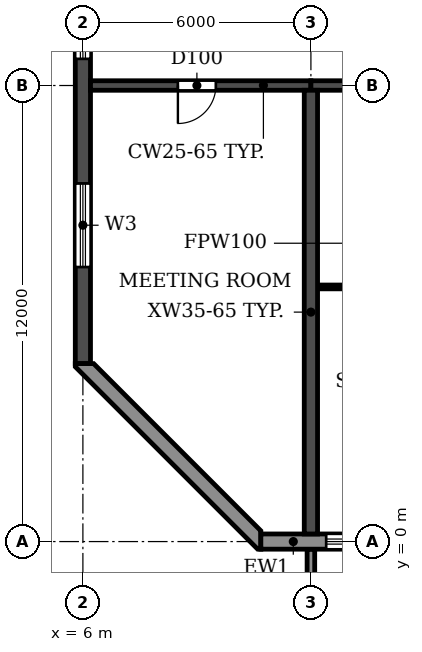
"""IFC4 building model, lengths in metres.
Left out: names, types, materials, properties, quantities, classifications, styles, units other than length and angle.
Written with IfcOpenShell. Run it as: python <this file> out.ifc"""

import sys

from ifc_helpers import new_model, si_unit, direction, frame, frame_2d, origin, place, context, subcontext, project, spatial, polyline, rectangle, outline, extrude, source, transform, mapped, element, fill, save


model = new_model("IFC4")
c1 = context("Model", 3, precision=1e-05, world=origin(), true_north=direction((0.0, 1.0)))
c2 = subcontext(c1, "Body", "Model", "MODEL_VIEW")
j1 = project(units=[si_unit("LENGTHUNIT", "METRE"), si_unit("PLANEANGLEUNIT", "RADIAN")], contexts=[c1])
p1 = place(None, origin())
s1 = spatial("IfcSite", under=j1, at=p1, CompositionType="ELEMENT")
p2 = place(p1, origin())
s2 = spatial("IfcBuilding", under=s1, at=p2, CompositionType="ELEMENT")
p3 = place(p2, frame((0.0, 0.0, 82.8)))
s3 = spatial("IfcBuildingStorey", under=s2, at=p3, CompositionType="ELEMENT", Elevation=82.8)
p4 = place(p3, frame((12.0, 0.2, 0.0), z_axis=(0.0, 0.0, 1.0), x_axis=(0.0, 1.0, 0.0)))
e1 = element("IfcWall", 1, at=p4, inside=s3, PredefinedType="SHEAR", context=c2, shape_type="SweptSolid", body=[
    extrude(rectangle(XDim=11.675, YDim=0.35, at=frame_2d((5.837, 0.0))), origin(), (0.0, 0.0, 1.0), 3.06),
])
p5 = place(p3, frame((6.0, 4.683, 0.0), z_axis=(0.0, 0.0, 1.0), x_axis=(0.0, 1.0, 0.0)))
e2 = element("IfcWall", 2, at=p5, inside=s3, PredefinedType="SHEAR", context=c2, shape_type="SweptSolid", body=[
    extrude(rectangle(XDim=34.234, YDim=0.4, at=frame_2d((17.117, 0.0))), origin(), (0.0, 0.0, 1.0), 3.06),
])
p6 = place(p5, frame((23.817, 0.0, 0.9)))
e3 = element("IfcOpeningElement", 3, at=p6, cuts=e2, PredefinedType="OPENING", context=c2, shape_type="SweptSolid", body=[
    extrude(rectangle(XDim=1.2, YDim=1.5, at=frame_2d((0.6, 0.75))), frame((0.0, 0.21, 0.0), z_axis=(0.0, -1.0, 0.0), x_axis=(1.0, 0.0, 0.0)), (0.0, 0.0, 1.0), 0.42),
])
p7 = place(p5, frame((8.017, 0.0, 0.9)))
e4 = element("IfcOpeningElement", 4, at=p7, cuts=e2, PredefinedType="OPENING", context=c2, shape_type="SweptSolid", body=[
    extrude(rectangle(XDim=1.2, YDim=1.5, at=frame_2d((0.6, 0.75))), frame((0.0, 0.21, 0.0), z_axis=(0.0, -1.0, 0.0), x_axis=(1.0, 0.0, 0.0)), (0.0, 0.0, 1.0), 0.42),
])
p8 = place(p5, frame((15.917, 0.0, 0.9)))
e5 = element("IfcOpeningElement", 5, at=p8, cuts=e2, PredefinedType="OPENING", context=c2, shape_type="SweptSolid", body=[
    extrude(rectangle(XDim=1.2, YDim=1.5, at=frame_2d((0.6, 0.75))), frame((0.0, 0.21, 0.0), z_axis=(0.0, -1.0, 0.0), x_axis=(1.0, 0.0, 0.0)), (0.0, 0.0, 1.0), 0.42),
])
p9 = place(p5, frame((28.894, 0.0, 0.6)))
e6 = element("IfcOpeningElement", 6, at=p9, cuts=e2, PredefinedType="OPENING", context=c2, shape_type="SweptSolid", body=[
    extrude(rectangle(XDim=2.2, YDim=1.8, at=frame_2d((1.1, 0.9))), frame((0.0, 0.21, 0.0), z_axis=(0.0, -1.0, 0.0), x_axis=(1.0, 0.0, 0.0)), (0.0, 0.0, 1.0), 0.42),
])
p10 = place(p5, frame((2.541, 0.0, 0.6)))
e7 = element("IfcOpeningElement", 7, at=p10, cuts=e2, PredefinedType="OPENING", context=c2, shape_type="SweptSolid", body=[
    extrude(rectangle(XDim=2.2, YDim=1.8, at=frame_2d((1.1, 0.9))), frame((0.0, 0.21, 0.0), z_axis=(0.0, -1.0, 0.0), x_axis=(1.0, 0.0, 0.0)), (0.0, 0.0, 1.0), 0.42),
])
p11 = place(p3, frame((6.2, 12.0, 0.0), z_axis=(0.0, 0.0, 1.0), x_axis=(1.0, 0.0, 0.0)))
e8 = element("IfcWall", 8, at=p11, inside=s3, PredefinedType="SHEAR", context=c2, shape_type="SweptSolid", body=[
    extrude(rectangle(XDim=5.8, YDim=0.25, at=frame_2d((2.9, 0.0))), origin(), (0.0, 0.0, 1.0), 2.46),
])
p12 = place(p11, frame((2.3, 0.0, 0.0)))
e9 = element("IfcOpeningElement", 9, at=p12, cuts=e8, PredefinedType="OPENING", context=c2, shape_type="SweptSolid", body=[
    extrude(rectangle(XDim=1.0, YDim=2.1, at=frame_2d((0.5, 1.05))), frame((0.0, 0.135, 0.0), z_axis=(0.0, -1.0, 0.0), x_axis=(1.0, 0.0, 0.0)), (0.0, 0.0, 1.0), 0.27),
])
p13 = place(p3, frame((12.0, 12.0, 0.0), z_axis=(0.0, 0.0, 1.0), x_axis=(1.0, 0.0, 0.0)))
e10 = element("IfcWall", 10, at=p13, inside=s3, PredefinedType="SHEAR", context=c2, shape_type="SweptSolid", body=[
    extrude(rectangle(XDim=6.0, YDim=0.25, at=frame_2d((3.0, 0.0))), origin(), (0.0, 0.0, 1.0), 2.46),
])
p14 = place(p13, frame((2.55, 0.0, 0.0)))
e11 = element("IfcOpeningElement", 11, at=p14, cuts=e10, PredefinedType="OPENING", context=c2, shape_type="SweptSolid", body=[
    extrude(rectangle(XDim=1.0, YDim=2.1, at=frame_2d((0.5, 1.05))), frame((0.0, 0.135, 0.0), z_axis=(0.0, -1.0, 0.0), x_axis=(1.0, 0.0, 0.0)), (0.0, 0.0, 1.0), 0.27),
])
p15 = place(p3, frame((10.683, 0.0, 0.0), z_axis=(0.0, 0.0, 1.0), x_axis=(1.0, 0.0, 0.0)))
e12 = element("IfcWall", 12, at=p15, inside=s3, PredefinedType="STANDARD", context=c2, shape_type="SweptSolid", body=[
    extrude(rectangle(XDim=80.634, YDim=0.4, at=frame_2d((40.317, 0.0))), origin(), (0.0, 0.0, 1.0), 3.06),
])
p16 = place(p15, frame((1.717, 0.0, 0.9)))
e13 = element("IfcOpeningElement", 13, at=p16, cuts=e12, PredefinedType="OPENING", context=c2, shape_type="SweptSolid", body=[
    extrude(rectangle(XDim=2.2, YDim=1.5, at=frame_2d((1.1, 0.75))), frame((0.0, 0.21, 0.0), z_axis=(0.0, -1.0, 0.0), x_axis=(1.0, 0.0, 0.0)), (0.0, 0.0, 1.0), 0.42),
])
p17 = place(p15, frame((4.917, 0.0, 0.0)))
e14 = element("IfcOpeningElement", 14, at=p17, cuts=e12, PredefinedType="OPENING", context=c2, shape_type="SweptSolid", body=[
    extrude(rectangle(XDim=1.8, YDim=2.4, at=frame_2d((0.9, 1.2))), frame((0.0, 0.21, 0.0), z_axis=(0.0, -1.0, 0.0), x_axis=(1.0, 0.0, 0.0)), (0.0, 0.0, 1.0), 0.42),
])
p18 = place(p15, frame((7.717, 0.0, 0.9)))
e15 = element("IfcOpeningElement", 15, at=p18, cuts=e12, PredefinedType="OPENING", context=c2, shape_type="SweptSolid", body=[
    extrude(rectangle(XDim=2.2, YDim=1.5, at=frame_2d((1.1, 0.75))), frame((0.0, 0.21, 0.0), z_axis=(0.0, -1.0, 0.0), x_axis=(1.0, 0.0, 0.0)), (0.0, 0.0, 1.0), 0.42),
])
p19 = place(p15, frame((10.717, 0.0, 0.9)))
e16 = element("IfcOpeningElement", 16, at=p19, cuts=e12, PredefinedType="OPENING", context=c2, shape_type="SweptSolid", body=[
    extrude(rectangle(XDim=2.2, YDim=1.5, at=frame_2d((1.1, 0.75))), frame((0.0, 0.21, 0.0), z_axis=(0.0, -1.0, 0.0), x_axis=(1.0, 0.0, 0.0)), (0.0, 0.0, 1.0), 0.42),
])
p20 = place(p15, frame((13.917, 0.0, 0.0)))
e17 = element("IfcOpeningElement", 17, at=p20, cuts=e12, PredefinedType="OPENING", context=c2, shape_type="SweptSolid", body=[
    extrude(rectangle(XDim=1.8, YDim=2.4, at=frame_2d((0.9, 1.2))), frame((0.0, 0.21, 0.0), z_axis=(0.0, -1.0, 0.0), x_axis=(1.0, 0.0, 0.0)), (0.0, 0.0, 1.0), 0.42),
])
p21 = place(p15, frame((16.717, 0.0, 0.9)))
e18 = element("IfcOpeningElement", 18, at=p21, cuts=e12, PredefinedType="OPENING", context=c2, shape_type="SweptSolid", body=[
    extrude(rectangle(XDim=2.2, YDim=1.5, at=frame_2d((1.1, 0.75))), frame((0.0, 0.21, 0.0), z_axis=(0.0, -1.0, 0.0), x_axis=(1.0, 0.0, 0.0)), (0.0, 0.0, 1.0), 0.42),
])
p22 = place(p15, frame((19.717, 0.0, 0.9)))
e19 = element("IfcOpeningElement", 19, at=p22, cuts=e12, PredefinedType="OPENING", context=c2, shape_type="SweptSolid", body=[
    extrude(rectangle(XDim=2.2, YDim=1.5, at=frame_2d((1.1, 0.75))), frame((0.0, 0.21, 0.0), z_axis=(0.0, -1.0, 0.0), x_axis=(1.0, 0.0, 0.0)), (0.0, 0.0, 1.0), 0.42),
])
p23 = place(p15, frame((22.717, 0.0, 0.9)))
e20 = element("IfcOpeningElement", 20, at=p23, cuts=e12, PredefinedType="OPENING", context=c2, shape_type="SweptSolid", body=[
    extrude(rectangle(XDim=2.2, YDim=1.5, at=frame_2d((1.1, 0.75))), frame((0.0, 0.21, 0.0), z_axis=(0.0, -1.0, 0.0), x_axis=(1.0, 0.0, 0.0)), (0.0, 0.0, 1.0), 0.42),
])
p24 = place(p15, frame((25.917, 0.0, 0.0)))
e21 = element("IfcOpeningElement", 21, at=p24, cuts=e12, PredefinedType="OPENING", context=c2, shape_type="SweptSolid", body=[
    extrude(rectangle(XDim=1.8, YDim=2.4, at=frame_2d((0.9, 1.2))), frame((0.0, 0.21, 0.0), z_axis=(0.0, -1.0, 0.0), x_axis=(1.0, 0.0, 0.0)), (0.0, 0.0, 1.0), 0.42),
])
p25 = place(p15, frame((28.717, 0.0, 0.9)))
e22 = element("IfcOpeningElement", 22, at=p25, cuts=e12, PredefinedType="OPENING", context=c2, shape_type="SweptSolid", body=[
    extrude(rectangle(XDim=2.2, YDim=1.5, at=frame_2d((1.1, 0.75))), frame((0.0, 0.21, 0.0), z_axis=(0.0, -1.0, 0.0), x_axis=(1.0, 0.0, 0.0)), (0.0, 0.0, 1.0), 0.42),
])
p26 = place(p15, frame((31.717, 0.0, 0.9)))
e23 = element("IfcOpeningElement", 23, at=p26, cuts=e12, PredefinedType="OPENING", context=c2, shape_type="SweptSolid", body=[
    extrude(rectangle(XDim=2.2, YDim=1.5, at=frame_2d((1.1, 0.75))), frame((0.0, 0.21, 0.0), z_axis=(0.0, -1.0, 0.0), x_axis=(1.0, 0.0, 0.0)), (0.0, 0.0, 1.0), 0.42),
])
p27 = place(p15, frame((34.717, 0.0, 0.9)))
e24 = element("IfcOpeningElement", 24, at=p27, cuts=e12, PredefinedType="OPENING", context=c2, shape_type="SweptSolid", body=[
    extrude(rectangle(XDim=2.2, YDim=1.5, at=frame_2d((1.1, 0.75))), frame((0.0, 0.21, 0.0), z_axis=(0.0, -1.0, 0.0), x_axis=(1.0, 0.0, 0.0)), (0.0, 0.0, 1.0), 0.42),
])
p28 = place(p15, frame((37.717, 0.0, 0.9)))
e25 = element("IfcOpeningElement", 25, at=p28, cuts=e12, PredefinedType="OPENING", context=c2, shape_type="SweptSolid", body=[
    extrude(rectangle(XDim=2.2, YDim=1.5, at=frame_2d((1.1, 0.75))), frame((0.0, 0.21, 0.0), z_axis=(0.0, -1.0, 0.0), x_axis=(1.0, 0.0, 0.0)), (0.0, 0.0, 1.0), 0.42),
])
p29 = place(p15, frame((40.917, 0.0, 0.0)))
e26 = element("IfcOpeningElement", 26, at=p29, cuts=e12, PredefinedType="OPENING", context=c2, shape_type="SweptSolid", body=[
    extrude(rectangle(XDim=1.8, YDim=2.4, at=frame_2d((0.9, 1.2))), frame((0.0, 0.21, 0.0), z_axis=(0.0, -1.0, 0.0), x_axis=(1.0, 0.0, 0.0)), (0.0, 0.0, 1.0), 0.42),
])
p30 = place(p15, frame((43.717, 0.0, 0.9)))
e27 = element("IfcOpeningElement", 27, at=p30, cuts=e12, PredefinedType="OPENING", context=c2, shape_type="SweptSolid", body=[
    extrude(rectangle(XDim=2.2, YDim=1.5, at=frame_2d((1.1, 0.75))), frame((0.0, 0.21, 0.0), z_axis=(0.0, -1.0, 0.0), x_axis=(1.0, 0.0, 0.0)), (0.0, 0.0, 1.0), 0.42),
])
p31 = place(p15, frame((46.717, 0.0, 0.9)))
e28 = element("IfcOpeningElement", 28, at=p31, cuts=e12, PredefinedType="OPENING", context=c2, shape_type="SweptSolid", body=[
    extrude(rectangle(XDim=2.2, YDim=1.5, at=frame_2d((1.1, 0.75))), frame((0.0, 0.21, 0.0), z_axis=(0.0, -1.0, 0.0), x_axis=(1.0, 0.0, 0.0)), (0.0, 0.0, 1.0), 0.42),
])
p32 = place(p15, frame((49.717, 0.0, 0.9)))
e29 = element("IfcOpeningElement", 29, at=p32, cuts=e12, PredefinedType="OPENING", context=c2, shape_type="SweptSolid", body=[
    extrude(rectangle(XDim=2.2, YDim=1.5, at=frame_2d((1.1, 0.75))), frame((0.0, 0.21, 0.0), z_axis=(0.0, -1.0, 0.0), x_axis=(1.0, 0.0, 0.0)), (0.0, 0.0, 1.0), 0.42),
])
p33 = place(p15, frame((52.917, 0.0, 0.0)))
e30 = element("IfcOpeningElement", 30, at=p33, cuts=e12, PredefinedType="OPENING", context=c2, shape_type="SweptSolid", body=[
    extrude(rectangle(XDim=1.8, YDim=2.4, at=frame_2d((0.9, 1.2))), frame((0.0, 0.21, 0.0), z_axis=(0.0, -1.0, 0.0), x_axis=(1.0, 0.0, 0.0)), (0.0, 0.0, 1.0), 0.42),
])
p34 = place(p15, frame((55.717, 0.0, 0.9)))
e31 = element("IfcOpeningElement", 31, at=p34, cuts=e12, PredefinedType="OPENING", context=c2, shape_type="SweptSolid", body=[
    extrude(rectangle(XDim=2.2, YDim=1.5, at=frame_2d((1.1, 0.75))), frame((0.0, 0.21, 0.0), z_axis=(0.0, -1.0, 0.0), x_axis=(1.0, 0.0, 0.0)), (0.0, 0.0, 1.0), 0.42),
])
p35 = place(p15, frame((58.717, 0.0, 0.9)))
e32 = element("IfcOpeningElement", 32, at=p35, cuts=e12, PredefinedType="OPENING", context=c2, shape_type="SweptSolid", body=[
    extrude(rectangle(XDim=2.2, YDim=1.5, at=frame_2d((1.1, 0.75))), frame((0.0, 0.21, 0.0), z_axis=(0.0, -1.0, 0.0), x_axis=(1.0, 0.0, 0.0)), (0.0, 0.0, 1.0), 0.42),
])
p36 = place(p15, frame((61.717, 0.0, 0.9)))
e33 = element("IfcOpeningElement", 33, at=p36, cuts=e12, PredefinedType="OPENING", context=c2, shape_type="SweptSolid", body=[
    extrude(rectangle(XDim=2.2, YDim=1.5, at=frame_2d((1.1, 0.75))), frame((0.0, 0.21, 0.0), z_axis=(0.0, -1.0, 0.0), x_axis=(1.0, 0.0, 0.0)), (0.0, 0.0, 1.0), 0.42),
])
p37 = place(p15, frame((64.917, 0.0, 0.0)))
e34 = element("IfcOpeningElement", 34, at=p37, cuts=e12, PredefinedType="OPENING", context=c2, shape_type="SweptSolid", body=[
    extrude(rectangle(XDim=1.8, YDim=2.4, at=frame_2d((0.9, 1.2))), frame((0.0, 0.21, 0.0), z_axis=(0.0, -1.0, 0.0), x_axis=(1.0, 0.0, 0.0)), (0.0, 0.0, 1.0), 0.42),
])
p38 = place(p15, frame((67.717, 0.0, 0.9)))
e35 = element("IfcOpeningElement", 35, at=p38, cuts=e12, PredefinedType="OPENING", context=c2, shape_type="SweptSolid", body=[
    extrude(rectangle(XDim=2.2, YDim=1.5, at=frame_2d((1.1, 0.75))), frame((0.0, 0.21, 0.0), z_axis=(0.0, -1.0, 0.0), x_axis=(1.0, 0.0, 0.0)), (0.0, 0.0, 1.0), 0.42),
])
p39 = place(p15, frame((70.717, 0.0, 0.9)))
e36 = element("IfcOpeningElement", 36, at=p39, cuts=e12, PredefinedType="OPENING", context=c2, shape_type="SweptSolid", body=[
    extrude(rectangle(XDim=2.2, YDim=1.5, at=frame_2d((1.1, 0.75))), frame((0.0, 0.21, 0.0), z_axis=(0.0, -1.0, 0.0), x_axis=(1.0, 0.0, 0.0)), (0.0, 0.0, 1.0), 0.42),
])
p40 = place(p15, frame((73.917, 0.0, 0.0)))
e37 = element("IfcOpeningElement", 37, at=p40, cuts=e12, PredefinedType="OPENING", context=c2, shape_type="SweptSolid", body=[
    extrude(rectangle(XDim=1.8, YDim=2.4, at=frame_2d((0.9, 1.2))), frame((0.0, 0.21, 0.0), z_axis=(0.0, -1.0, 0.0), x_axis=(1.0, 0.0, 0.0)), (0.0, 0.0, 1.0), 0.42),
])
p41 = place(p15, frame((76.717, 0.0, 0.9)))
e38 = element("IfcOpeningElement", 38, at=p41, cuts=e12, PredefinedType="OPENING", context=c2, shape_type="SweptSolid", body=[
    extrude(rectangle(XDim=2.2, YDim=1.5, at=frame_2d((1.1, 0.75))), frame((0.0, 0.21, 0.0), z_axis=(0.0, -1.0, 0.0), x_axis=(1.0, 0.0, 0.0)), (0.0, 0.0, 1.0), 0.42),
])
p42 = place(p3, origin())
e39 = element("IfcWall", 39, at=p42, inside=s3, PredefinedType="STANDARD", context=c2, shape_type="SweptSolid", body=[
    extrude(outline(polyline([(5.8, 4.683), (5.8, 4.6), (10.6, -0.2), (10.683, -0.2), (10.683, 0.283), (6.283, 4.683), (5.8, 4.683)])), origin(), (0.0, 0.0, 1.0), 3.06),
])
m1 = source(origin(), c2, "Body", "SweptSolid", [
    extrude(outline(polyline([(0.0, 0.0), (0.2, 0.0), (0.2, 1.65), (0.0, 1.65), (0.0, 0.0)])), origin(), (0.0, 0.0, 1.0), 3.1),
])
p43 = place(p3, frame((11.9, -1.85, 0.0)))
e40 = element("IfcWall", 40, at=p43, inside=s3, PredefinedType="STANDARD", context=c2, shape_type="MappedRepresentation", body=[
    mapped(m1, transform((0.0, 0.0, 0.0))),
])
p44 = place(p3, frame((12.185, 6.7, 0.0), z_axis=(0.0, 0.0, 1.0), x_axis=(1.0, 0.0, 0.0)))
e41 = element("IfcWall", 41, at=p44, inside=s3, PredefinedType="PARTITIONING", context=c2, shape_type="SweptSolid", body=[
    extrude(rectangle(XDim=2.015, YDim=0.1, at=frame_2d((1.007, 0.0))), origin(), (0.0, 0.0, 1.0), 3.06),
])
p45 = place(p16, origin())
e42 = element("IfcWindow", 42, at=p45, inside=s3, PartitioningType="DOUBLE_PANEL_HORIZONTAL", PredefinedType="WINDOW", context=c2, shape_type="SweptSolid", body=[
    extrude(rectangle(XDim=2.2, YDim=1.5, at=frame_2d((1.1, 0.75))), frame((0.0, 0.03, 0.0), z_axis=(0.0, -1.0, 0.0), x_axis=(1.0, 0.0, 0.0)), (0.0, 0.0, 1.0), 0.06),
])
fill(e13, e42)
p46 = place(p7, origin())
e43 = element("IfcWindow", 43, at=p46, inside=s3, PartitioningType="SINGLE_PANEL", PredefinedType="WINDOW", context=c2, shape_type="SweptSolid", body=[
    extrude(rectangle(XDim=1.2, YDim=1.5, at=frame_2d((0.6, 0.75))), frame((0.0, 0.03, 0.0), z_axis=(0.0, -1.0, 0.0), x_axis=(1.0, 0.0, 0.0)), (0.0, 0.0, 1.0), 0.06),
])
fill(e4, e43)
p47 = place(p10, origin())
e44 = element("IfcWindow", 44, at=p47, inside=s3, PartitioningType="DOUBLE_PANEL_HORIZONTAL", PredefinedType="WINDOW", context=c2, shape_type="SweptSolid", body=[
    extrude(rectangle(XDim=2.2, YDim=1.8, at=frame_2d((1.1, 0.9))), frame((0.0, 0.03, 0.0), z_axis=(0.0, -1.0, 0.0), x_axis=(1.0, 0.0, 0.0)), (0.0, 0.0, 1.0), 0.06),
])
fill(e7, e44)
p48 = place(p12, frame((1.0, 0.0, 0.0), z_axis=(0.0, 0.0, 1.0), x_axis=(-1.0, 0.0, 0.0)))
e45 = element("IfcDoor", 45, at=p48, inside=s3, OperationType="SINGLE_SWING_RIGHT", PredefinedType="DOOR", context=c2, shape_type="SweptSolid", body=[
    extrude(rectangle(XDim=1.0, YDim=2.1, at=frame_2d((0.5, 1.05))), frame((0.0, 0.025, 0.0), z_axis=(0.0, -1.0, 0.0), x_axis=(1.0, 0.0, 0.0)), (0.0, 0.0, 1.0), 0.05),
])
fill(e9, e45)
save(model, sys.argv[1])
